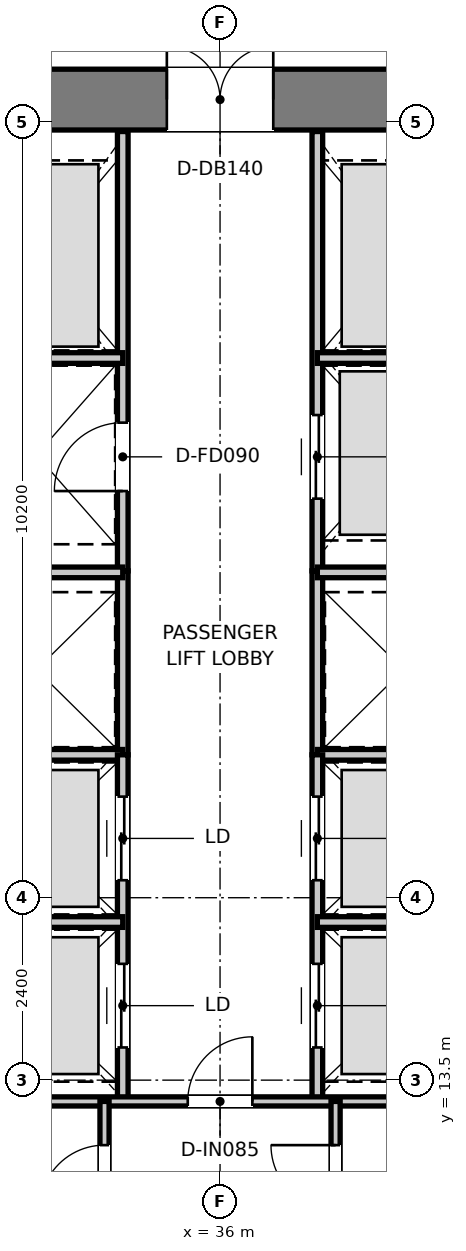
"""IFC4 building model, lengths in metres.
Left out: names, types, materials, properties, quantities, classifications, styles, units other than length and angle.
Written with IfcOpenShell. Run it as: python <this file> out.ifc"""

import sys

from ifc_helpers import new_model, si_unit, direction, frame, frame_2d, origin, place, context, subcontext, project, spatial, rectangle, extrude, element, fill, save


model = new_model("IFC4")
c1 = context("Model", 3, precision=1e-05, world=origin(), true_north=direction((0.0, 1.0)))
c2 = subcontext(c1, "Body", "Model", "MODEL_VIEW")
j1 = project(units=[si_unit("LENGTHUNIT", "METRE"), si_unit("PLANEANGLEUNIT", "RADIAN")], contexts=[c1])
p1 = place(None, origin())
s1 = spatial("IfcSite", under=j1, at=p1, CompositionType="ELEMENT")
p2 = place(p1, origin())
s2 = spatial("IfcBuilding", under=s1, at=p2, CompositionType="ELEMENT")
p3 = place(p2, frame((0.0, 0.0, 76.35)))
s3 = spatial("IfcBuildingStorey", under=s2, at=p3, CompositionType="ELEMENT", Elevation=76.35)
p4 = place(p3, frame((28.08, 26.4, 0.0), z_axis=(0.0, 0.0, 1.0), x_axis=(1.0, 0.0, 0.0)))
e1 = element("IfcWall", 1, at=p4, inside=s3, PredefinedType="SHEAR", context=c2, shape_type="SweptSolid", body=[
    extrude(rectangle(XDim=15.84, YDim=0.8, at=frame_2d((7.92, 0.0))), origin(), (0.0, 0.0, 1.0), 3.95),
])
p5 = place(p4, frame((7.22, 0.0, 0.0)))
e2 = element("IfcOpeningElement", 2, at=p5, cuts=e1, PredefinedType="OPENING", context=c2, shape_type="SweptSolid", body=[
    extrude(rectangle(XDim=1.4, YDim=2.2, at=frame_2d((0.7, 1.1))), frame((0.0, 0.41, 0.0), z_axis=(0.0, -1.0, 0.0), x_axis=(1.0, 0.0, 0.0)), (0.0, 0.0, 1.0), 0.82),
])
p6 = place(p4, frame((1.775, 0.0, 0.0)))
e3 = element("IfcOpeningElement", 3, at=p6, cuts=e1, PredefinedType="OPENING", context=c2, shape_type="SweptSolid", body=[
    extrude(rectangle(XDim=1.05, YDim=2.1, at=frame_2d((0.525, 1.05))), frame((0.0, 0.41, 0.0), z_axis=(0.0, -1.0, 0.0), x_axis=(1.0, 0.0, 0.0)), (0.0, 0.0, 1.0), 0.82),
])
p7 = place(p4, frame((13.015, 0.0, 0.0)))
e4 = element("IfcOpeningElement", 4, at=p7, cuts=e1, PredefinedType="OPENING", context=c2, shape_type="SweptSolid", body=[
    extrude(rectangle(XDim=1.05, YDim=2.1, at=frame_2d((0.525, 1.05))), frame((0.0, 0.41, 0.0), z_axis=(0.0, -1.0, 0.0), x_axis=(1.0, 0.0, 0.0)), (0.0, 0.0, 1.0), 0.82),
])
p8 = place(p3, frame((34.72, 20.2, 0.0), z_axis=(0.0, 0.0, 1.0), x_axis=(0.0, 1.0, 0.0)))
e5 = element("IfcWall", 5, at=p8, inside=s3, PredefinedType="PARTITIONING", context=c2, shape_type="SweptSolid", body=[
    extrude(rectangle(XDim=5.78, YDim=0.14, at=frame_2d((2.89, 0.0))), origin(), (0.0, 0.0, 1.0), 2.39),
])
p9 = place(p8, frame((1.05, 0.0, 0.0)))
e6 = element("IfcOpeningElement", 6, at=p9, cuts=e5, PredefinedType="OPENING", context=c2, shape_type="SweptSolid", body=[
    extrude(rectangle(XDim=0.9, YDim=2.1, at=frame_2d((0.45, 1.05))), frame((0.0, 0.08, 0.0), z_axis=(0.0, -1.0, 0.0), x_axis=(1.0, 0.0, 0.0)), (0.0, 0.0, 1.0), 0.16),
])
p10 = place(p3, frame((37.28, 20.2, 0.0), z_axis=(0.0, 0.0, 1.0), x_axis=(0.0, 1.0, 0.0)))
e7 = element("IfcWall", 7, at=p10, inside=s3, PredefinedType="PARTITIONING", context=c2, shape_type="SweptSolid", body=[
    extrude(rectangle(XDim=5.78, YDim=0.14, at=frame_2d((2.89, 0.0))), origin(), (0.0, 0.0, 1.0), 2.39),
])
p11 = place(p10, frame((0.95, 0.0, 0.0)))
e8 = element("IfcOpeningElement", 8, at=p11, cuts=e7, PredefinedType="OPENING", context=c2, shape_type="SweptSolid", body=[
    extrude(rectangle(XDim=1.1, YDim=2.15, at=frame_2d((0.55, 1.075))), frame((0.0, 0.08, 0.0), z_axis=(0.0, -1.0, 0.0), x_axis=(1.0, 0.0, 0.0)), (0.0, 0.0, 1.0), 0.16),
])
for number, where, z_axis, x_axis in (
    (9, (32.45, 23.0, 0.0), (0.0, 0.0, 1.0), (1.0, 0.0, 0.0)),
    (10, (37.28, 23.0, 0.0), (0.0, 0.0, 1.0), (1.0, 0.0, 0.0)),
):
    element("IfcWall", number, at=place(p3, frame(where, z_axis=z_axis, x_axis=x_axis)), inside=s3, PredefinedType="PARTITIONING", context=c2, shape_type="SweptSolid", body=[
        extrude(rectangle(XDim=2.27, YDim=0.14, at=frame_2d((1.135, 0.0))), origin(), (0.0, 0.0, 1.0), 2.39),
    ])
for number, where, z_axis, x_axis in (
    (11, (34.72, 17.78, 0.0), (0.0, 0.0, 1.0), (0.0, 1.0, 0.0)),
    (12, (37.28, 17.78, 0.0), (0.0, 0.0, 1.0), (0.0, 1.0, 0.0)),
):
    element("IfcWall", number, at=place(p3, frame(where, z_axis=z_axis, x_axis=x_axis)), inside=s3, PredefinedType="PARTITIONING", context=c2, shape_type="SweptSolid", body=[
        extrude(rectangle(XDim=2.42, YDim=0.14, at=frame_2d((1.21, 0.0))), origin(), (0.0, 0.0, 1.0), 3.59),
    ])
for number, where, z_axis, x_axis in (
    (13, (32.45, 17.78, 0.0), (0.0, 0.0, 1.0), (1.0, 0.0, 0.0)),
    (14, (32.45, 20.18, 0.0), (0.0, 0.0, 1.0), (1.0, 0.0, 0.0)),
    (15, (37.28, 17.78, 0.0), (0.0, 0.0, 1.0), (1.0, 0.0, 0.0)),
    (16, (37.28, 20.18, 0.0), (0.0, 0.0, 1.0), (1.0, 0.0, 0.0)),
):
    element("IfcWall", number, at=place(p3, frame(where, z_axis=z_axis, x_axis=x_axis)), inside=s3, PredefinedType="PARTITIONING", context=c2, shape_type="SweptSolid", body=[
        extrude(rectangle(XDim=2.27, YDim=0.14, at=frame_2d((1.135, 0.0))), origin(), (0.0, 0.0, 1.0), 3.59),
    ])
p12 = place(p3, frame((34.72, 13.22, 0.0), z_axis=(0.0, 0.0, 1.0), x_axis=(0.0, 1.0, 0.0)))
e17 = element("IfcWall", 17, at=p12, inside=s3, PredefinedType="PARTITIONING", context=c2, shape_type="SweptSolid", body=[
    extrude(rectangle(XDim=4.56, YDim=0.14, at=frame_2d((2.28, 0.0))), origin(), (0.0, 0.0, 1.0), 3.59),
])
p13 = place(p12, frame((0.71, 0.0, 0.0)))
e18 = element("IfcOpeningElement", 18, at=p13, cuts=e17, PredefinedType="OPENING", context=c2, shape_type="SweptSolid", body=[
    extrude(rectangle(XDim=1.1, YDim=2.15, at=frame_2d((0.55, 1.075))), frame((0.0, 0.08, 0.0), z_axis=(0.0, -1.0, 0.0), x_axis=(1.0, 0.0, 0.0)), (0.0, 0.0, 1.0), 0.16),
])
p14 = place(p12, frame((2.91, 0.0, 0.0)))
e19 = element("IfcOpeningElement", 19, at=p14, cuts=e17, PredefinedType="OPENING", context=c2, shape_type="SweptSolid", body=[
    extrude(rectangle(XDim=1.1, YDim=2.15, at=frame_2d((0.55, 1.075))), frame((0.0, 0.08, 0.0), z_axis=(0.0, -1.0, 0.0), x_axis=(1.0, 0.0, 0.0)), (0.0, 0.0, 1.0), 0.16),
])
p15 = place(p3, frame((32.45, 15.58, 0.0), z_axis=(0.0, 0.0, 1.0), x_axis=(1.0, 0.0, 0.0)))
e20 = element("IfcWall", 20, at=p15, inside=s3, PredefinedType="PARTITIONING", context=c2, shape_type="SweptSolid", body=[
    extrude(rectangle(XDim=2.27, YDim=0.14, at=frame_2d((1.135, 0.0))), origin(), (0.0, 0.0, 1.0), 3.59),
])
p16 = place(p3, frame((37.28, 13.22, 0.0), z_axis=(0.0, 0.0, 1.0), x_axis=(0.0, 1.0, 0.0)))
e21 = element("IfcWall", 21, at=p16, inside=s3, PredefinedType="PARTITIONING", context=c2, shape_type="SweptSolid", body=[
    extrude(rectangle(XDim=4.56, YDim=0.14, at=frame_2d((2.28, 0.0))), origin(), (0.0, 0.0, 1.0), 3.59),
])
p17 = place(p16, frame((0.71, 0.0, 0.0)))
e22 = element("IfcOpeningElement", 22, at=p17, cuts=e21, PredefinedType="OPENING", context=c2, shape_type="SweptSolid", body=[
    extrude(rectangle(XDim=1.1, YDim=2.15, at=frame_2d((0.55, 1.075))), frame((0.0, 0.08, 0.0), z_axis=(0.0, -1.0, 0.0), x_axis=(1.0, 0.0, 0.0)), (0.0, 0.0, 1.0), 0.16),
])
p18 = place(p16, frame((2.91, 0.0, 0.0)))
e23 = element("IfcOpeningElement", 23, at=p18, cuts=e21, PredefinedType="OPENING", context=c2, shape_type="SweptSolid", body=[
    extrude(rectangle(XDim=1.1, YDim=2.15, at=frame_2d((0.55, 1.075))), frame((0.0, 0.08, 0.0), z_axis=(0.0, -1.0, 0.0), x_axis=(1.0, 0.0, 0.0)), (0.0, 0.0, 1.0), 0.16),
])
p19 = place(p3, frame((37.28, 15.58, 0.0), z_axis=(0.0, 0.0, 1.0), x_axis=(1.0, 0.0, 0.0)))
e24 = element("IfcWall", 24, at=p19, inside=s3, PredefinedType="PARTITIONING", context=c2, shape_type="SweptSolid", body=[
    extrude(rectangle(XDim=2.27, YDim=0.14, at=frame_2d((1.135, 0.0))), origin(), (0.0, 0.0, 1.0), 3.59),
])
p20 = place(p3, frame((32.21, 13.22, 0.0), z_axis=(0.0, 0.0, 1.0), x_axis=(1.0, 0.0, 0.0)))
e25 = element("IfcWall", 25, at=p20, inside=s3, PredefinedType="PARTITIONING", context=c2, shape_type="SweptSolid", body=[
    extrude(rectangle(XDim=7.58, YDim=0.12, at=frame_2d((3.79, 0.0))), origin(), (0.0, 0.0, 1.0), 3.59),
])
p21 = place(p20, frame((3.365, 0.0, 0.0)))
e26 = element("IfcOpeningElement", 26, at=p21, cuts=e25, PredefinedType="OPENING", context=c2, shape_type="SweptSolid", body=[
    extrude(rectangle(XDim=0.85, YDim=2.1, at=frame_2d((0.425, 1.05))), frame((0.0, 0.07, 0.0), z_axis=(0.0, -1.0, 0.0), x_axis=(1.0, 0.0, 0.0)), (0.0, 0.0, 1.0), 0.14),
])
p22 = place(p3, frame((34.48, 11.25, 0.0), z_axis=(0.0, 0.0, 1.0), x_axis=(0.0, 1.0, 0.0)))
e27 = element("IfcWall", 27, at=p22, inside=s3, PredefinedType="PARTITIONING", context=c2, shape_type="SweptSolid", body=[
    extrude(rectangle(XDim=1.97, YDim=0.12, at=frame_2d((0.985, 0.0))), origin(), (0.0, 0.0, 1.0), 3.59),
])
p23 = place(p22, frame((0.545, 0.0, 0.0)))
e28 = element("IfcOpeningElement", 28, at=p23, cuts=e27, PredefinedType="OPENING", context=c2, shape_type="SweptSolid", body=[
    extrude(rectangle(XDim=0.85, YDim=2.1, at=frame_2d((0.425, 1.05))), frame((0.0, 0.07, 0.0), z_axis=(0.0, -1.0, 0.0), x_axis=(1.0, 0.0, 0.0)), (0.0, 0.0, 1.0), 0.14),
])
p24 = place(p3, frame((37.52, 11.25, 0.0), z_axis=(0.0, 0.0, 1.0), x_axis=(0.0, 1.0, 0.0)))
e29 = element("IfcWall", 29, at=p24, inside=s3, PredefinedType="PARTITIONING", context=c2, shape_type="SweptSolid", body=[
    extrude(rectangle(XDim=1.97, YDim=0.12, at=frame_2d((0.985, 0.0))), origin(), (0.0, 0.0, 1.0), 3.59),
])
p25 = place(p24, frame((0.545, 0.0, 0.0)))
e30 = element("IfcOpeningElement", 30, at=p25, cuts=e29, PredefinedType="OPENING", context=c2, shape_type="SweptSolid", body=[
    extrude(rectangle(XDim=0.85, YDim=2.1, at=frame_2d((0.425, 1.05))), frame((0.0, 0.07, 0.0), z_axis=(0.0, -1.0, 0.0), x_axis=(1.0, 0.0, 0.0)), (0.0, 0.0, 1.0), 0.14),
])
p26 = place(p5, origin())
e31 = element("IfcDoor", 31, at=p26, inside=s3, OperationType="DOUBLE_DOOR_SINGLE_SWING", PredefinedType="DOOR", context=c2, shape_type="SweptSolid", body=[
    extrude(rectangle(XDim=1.4, YDim=2.2, at=frame_2d((0.7, 1.1))), frame((0.0, 0.025, 0.0), z_axis=(0.0, -1.0, 0.0), x_axis=(1.0, 0.0, 0.0)), (0.0, 0.0, 1.0), 0.05),
])
fill(e2, e31)
p27 = place(p9, origin())
e32 = element("IfcDoor", 32, at=p27, inside=s3, OperationType="SINGLE_SWING_LEFT", PredefinedType="DOOR", context=c2, shape_type="SweptSolid", body=[
    extrude(rectangle(XDim=0.9, YDim=2.1, at=frame_2d((0.45, 1.05))), frame((0.0, 0.025, 0.0), z_axis=(0.0, -1.0, 0.0), x_axis=(1.0, 0.0, 0.0)), (0.0, 0.0, 1.0), 0.05),
])
fill(e6, e32)
p28 = place(p11, origin())
e33 = element("IfcDoor", 33, at=p28, inside=s3, OperationType="DOUBLE_DOOR_SLIDING", PredefinedType="DOOR", context=c2, shape_type="SweptSolid", body=[
    extrude(rectangle(XDim=1.1, YDim=2.15, at=frame_2d((0.55, 1.075))), frame((0.0, 0.025, 0.0), z_axis=(0.0, -1.0, 0.0), x_axis=(1.0, 0.0, 0.0)), (0.0, 0.0, 1.0), 0.05),
])
fill(e8, e33)
p29 = place(p13, origin())
e34 = element("IfcDoor", 34, at=p29, inside=s3, OperationType="DOUBLE_DOOR_SLIDING", PredefinedType="DOOR", context=c2, shape_type="SweptSolid", body=[
    extrude(rectangle(XDim=1.1, YDim=2.15, at=frame_2d((0.55, 1.075))), frame((0.0, 0.025, 0.0), z_axis=(0.0, -1.0, 0.0), x_axis=(1.0, 0.0, 0.0)), (0.0, 0.0, 1.0), 0.05),
])
fill(e18, e34)
p30 = place(p14, origin())
e35 = element("IfcDoor", 35, at=p30, inside=s3, OperationType="DOUBLE_DOOR_SLIDING", PredefinedType="DOOR", context=c2, shape_type="SweptSolid", body=[
    extrude(rectangle(XDim=1.1, YDim=2.15, at=frame_2d((0.55, 1.075))), frame((0.0, 0.025, 0.0), z_axis=(0.0, -1.0, 0.0), x_axis=(1.0, 0.0, 0.0)), (0.0, 0.0, 1.0), 0.05),
])
fill(e19, e35)
p31 = place(p17, origin())
e36 = element("IfcDoor", 36, at=p31, inside=s3, OperationType="DOUBLE_DOOR_SLIDING", PredefinedType="DOOR", context=c2, shape_type="SweptSolid", body=[
    extrude(rectangle(XDim=1.1, YDim=2.15, at=frame_2d((0.55, 1.075))), frame((0.0, 0.025, 0.0), z_axis=(0.0, -1.0, 0.0), x_axis=(1.0, 0.0, 0.0)), (0.0, 0.0, 1.0), 0.05),
])
fill(e22, e36)
p32 = place(p18, origin())
e37 = element("IfcDoor", 37, at=p32, inside=s3, OperationType="DOUBLE_DOOR_SLIDING", PredefinedType="DOOR", context=c2, shape_type="SweptSolid", body=[
    extrude(rectangle(XDim=1.1, YDim=2.15, at=frame_2d((0.55, 1.075))), frame((0.0, 0.025, 0.0), z_axis=(0.0, -1.0, 0.0), x_axis=(1.0, 0.0, 0.0)), (0.0, 0.0, 1.0), 0.05),
])
fill(e23, e37)
p33 = place(p21, origin())
e38 = element("IfcDoor", 38, at=p33, inside=s3, OperationType="SINGLE_SWING_RIGHT", PredefinedType="DOOR", context=c2, shape_type="SweptSolid", body=[
    extrude(rectangle(XDim=0.85, YDim=2.1, at=frame_2d((0.425, 1.05))), frame((0.0, 0.025, 0.0), z_axis=(0.0, -1.0, 0.0), x_axis=(1.0, 0.0, 0.0)), (0.0, 0.0, 1.0), 0.05),
])
fill(e26, e38)
p34 = place(p23, origin())
e39 = element("IfcDoor", 39, at=p34, inside=s3, OperationType="SINGLE_SWING_LEFT", PredefinedType="DOOR", context=c2, shape_type="SweptSolid", body=[
    extrude(rectangle(XDim=0.85, YDim=2.1, at=frame_2d((0.425, 1.05))), frame((0.0, 0.025, 0.0), z_axis=(0.0, -1.0, 0.0), x_axis=(1.0, 0.0, 0.0)), (0.0, 0.0, 1.0), 0.05),
])
fill(e28, e39)
p35 = place(p25, origin())
e40 = element("IfcDoor", 40, at=p35, inside=s3, OperationType="SINGLE_SWING_RIGHT", PredefinedType="DOOR", context=c2, shape_type="SweptSolid", body=[
    extrude(rectangle(XDim=0.85, YDim=2.1, at=frame_2d((0.425, 1.05))), frame((0.0, 0.025, 0.0), z_axis=(0.0, -1.0, 0.0), x_axis=(1.0, 0.0, 0.0)), (0.0, 0.0, 1.0), 0.05),
])
fill(e30, e40)
save(model, sys.argv[1])
